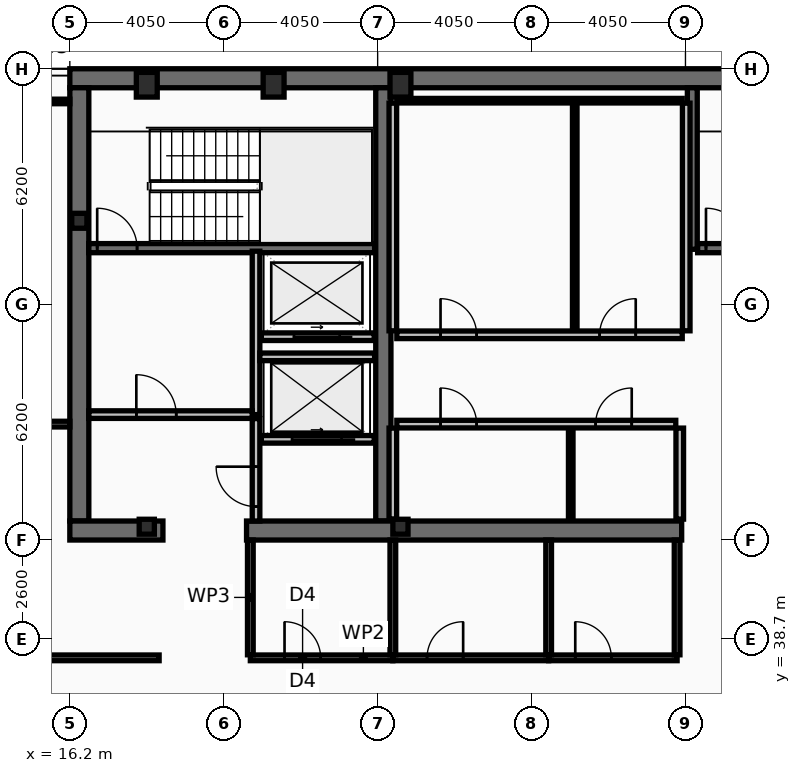
"""IFC4 building model, lengths in metres.
Left out: names, types, materials, properties, quantities, classifications, styles, units other than length and angle.
Written with IfcOpenShell. Run it as: python <this file> out.ifc"""

import sys

from ifc_helpers import new_model, si_unit, direction, frame, frame_2d, origin, origin_2d, place, context, subcontext, project, spatial, rectangle, hollow_rectangle, i_section, extrude, element, fill, save


model = new_model("IFC4")
c1 = context("Model", 3, precision=1e-05, world=origin(), true_north=direction((0.0, 1.0)))
c2 = subcontext(c1, "Body", "Model", "MODEL_VIEW")
j1 = project(units=[si_unit("LENGTHUNIT", "METRE"), si_unit("PLANEANGLEUNIT", "RADIAN")], contexts=[c1])
p1 = place(None, origin())
s1 = spatial("IfcSite", under=j1, at=p1, CompositionType="ELEMENT")
p2 = place(p1, origin())
s2 = spatial("IfcBuilding", under=s1, at=p2, CompositionType="ELEMENT")
p3 = place(p2, frame((0.0, 0.0, 291.4)))
s3 = spatial("IfcBuildingStorey", under=s2, at=p3, CompositionType="ELEMENT", Elevation=291.4)
p4 = place(p3, frame((16.2, 53.45, 0.0), z_axis=(0.0, 0.0, 1.0), x_axis=(1.0, 0.0, 0.0)))
e1 = element("IfcWall", 1, at=p4, inside=s3, PredefinedType="SHEAR", context=c2, shape_type="SweptSolid", body=[
    extrude(rectangle(XDim=40.5, YDim=0.5, at=frame_2d((20.25, 0.0))), origin(), (0.0, 0.0, 1.0), 3.44),
])
p5 = place(p3, frame((16.45, 41.8, 0.0), z_axis=(0.0, 0.0, 1.0), x_axis=(0.0, 1.0, 0.0)))
e2 = element("IfcWall", 2, at=p5, inside=s3, PredefinedType="SHEAR", context=c2, shape_type="SweptSolid", body=[
    extrude(rectangle(XDim=11.4, YDim=0.5, at=frame_2d((5.7, 0.0))), origin(), (0.0, 0.0, 1.0), 3.44),
])
p6 = place(p3, frame((24.45, 41.8, 0.0), z_axis=(0.0, 0.0, 1.0), x_axis=(0.0, 1.0, 0.0)))
e3 = element("IfcWall", 3, at=p6, inside=s3, PredefinedType="SHEAR", context=c2, shape_type="SweptSolid", body=[
    extrude(rectangle(XDim=11.4, YDim=0.4, at=frame_2d((5.7, 0.0))), origin(), (0.0, 0.0, 1.0), 3.44),
])
p7 = place(p3, frame((18.65, 41.55, 0.0), z_axis=(0.0, 0.0, 1.0), x_axis=(-1.0, 0.0, 0.0)))
e4 = element("IfcWall", 4, at=p7, inside=s3, PredefinedType="SHEAR", context=c2, shape_type="SweptSolid", body=[
    extrude(rectangle(XDim=2.45, YDim=0.5, at=frame_2d((1.225, 0.0))), origin(), (0.0, 0.0, 1.0), 3.44),
])
p8 = place(p3, frame((32.3, 41.55, 0.0), z_axis=(0.0, 0.0, 1.0), x_axis=(-1.0, 0.0, 0.0)))
e5 = element("IfcWall", 5, at=p8, inside=s3, PredefinedType="SHEAR", context=c2, shape_type="SweptSolid", body=[
    extrude(rectangle(XDim=11.45, YDim=0.5, at=frame_2d((5.725, 0.0))), origin(), (0.0, 0.0, 1.0), 3.44),
])
p9 = place(p3, frame((32.58, 48.95, 0.0), z_axis=(0.0, 0.0, 1.0), x_axis=(0.0, 1.0, 0.0)))
e6 = element("IfcWall", 6, at=p9, inside=s3, PredefinedType="SHEAR", context=c2, shape_type="SweptSolid", body=[
    extrude(rectangle(XDim=4.25, YDim=0.26, at=frame_2d((2.125, 0.0))), origin(), (0.0, 0.0, 1.0), 3.44),
])
p10 = place(p3, frame((16.7, 48.98, 0.0), z_axis=(0.0, 0.0, 1.0), x_axis=(1.0, 0.0, 0.0)))
e7 = element("IfcWall", 7, at=p10, inside=s3, PredefinedType="SHEAR", context=c2, shape_type="SweptSolid", body=[
    extrude(rectangle(XDim=7.52, YDim=0.24, at=frame_2d((3.76, 0.0))), origin(), (0.0, 0.0, 1.0), 3.44),
])
p11 = place(p10, frame((0.22, 0.0, 0.0)))
e8 = element("IfcOpeningElement", 8, at=p11, cuts=e7, PredefinedType="OPENING", context=c2, shape_type="SweptSolid", body=[
    extrude(rectangle(XDim=1.05, YDim=2.15, at=frame_2d((0.525, 1.075))), frame((0.0, 0.13, 0.0), z_axis=(0.0, -1.0, 0.0), x_axis=(1.0, 0.0, 0.0)), (0.0, 0.0, 1.0), 0.26),
])
p12 = place(p3, frame((32.72, 48.98, 0.0), z_axis=(0.0, 0.0, 1.0), x_axis=(1.0, 0.0, 0.0)))
e9 = element("IfcWall", 9, at=p12, inside=s3, PredefinedType="SHEAR", context=c2, shape_type="SweptSolid", body=[
    extrude(rectangle(XDim=7.56, YDim=0.24, at=frame_2d((3.78, 0.0))), origin(), (0.0, 0.0, 1.0), 3.44),
])
p13 = place(p12, frame((0.22, 0.0, 0.0)))
e10 = element("IfcOpeningElement", 10, at=p13, cuts=e9, PredefinedType="OPENING", context=c2, shape_type="SweptSolid", body=[
    extrude(rectangle(XDim=1.05, YDim=2.15, at=frame_2d((0.525, 1.075))), frame((0.0, 0.13, 0.0), z_axis=(0.0, -1.0, 0.0), x_axis=(1.0, 0.0, 0.0)), (0.0, 0.0, 1.0), 0.26),
])
for number, where, z_axis, x_axis in (
    (11, (18.225, 53.28, 0.0), (0.0, 0.0, 1.0), (1.0, 0.0, 0.0)),
    (12, (21.562, 53.28, 0.0), (0.0, 0.0, 1.0), (1.0, 0.0, 0.0)),
    (13, (24.9, 53.28, 0.0), (0.0, 0.0, 1.0), (1.0, 0.0, 0.0)),
):
    element("IfcColumn", number, at=place(p3, frame(where, z_axis=z_axis, x_axis=x_axis)), inside=s3, PredefinedType="COLUMN", context=c2, shape_type="SweptSolid", body=[
        extrude(hollow_rectangle(XDim=0.55, YDim=0.65, WallThickness=0.04, at=origin_2d()), origin(), (0.0, 0.0, 1.0), 3.6),
    ])
for number, where, z_axis, x_axis in (
    (14, (16.45, 49.7, 0.0), (0.0, 0.0, 1.0), (1.0, 0.0, 0.0)),
    (15, (18.225, 41.65, 0.0), (0.0, 0.0, 1.0), (1.0, 0.0, 0.0)),
    (16, (24.9, 41.65, 0.0), (0.0, 0.0, 1.0), (1.0, 0.0, 0.0)),
):
    element("IfcColumn", number, at=place(p3, frame(where, z_axis=z_axis, x_axis=x_axis)), inside=s3, PredefinedType="COLUMN", context=c2, shape_type="SweptSolid", body=[
        extrude(i_section(OverallWidth=0.399, OverallDepth=0.393, WebThickness=0.023, FlangeThickness=0.037, at=origin_2d()), origin(), (0.0, 0.0, 1.0), 3.6),
    ])
p14 = place(p3, frame((24.21, 43.95, 0.0), z_axis=(0.0, 0.0, 1.0), x_axis=(-1.0, 0.0, 0.0)))
e17 = element("IfcWall", 17, at=p14, inside=s3, PredefinedType="PARTITIONING", context=c2, shape_type="SweptSolid", body=[
    extrude(rectangle(XDim=2.97, YDim=0.2, at=frame_2d((1.485, 0.0))), origin(), (0.0, 0.0, 1.0), 3.44),
])
p15 = place(p14, frame((0.86, 0.0, 0.0)))
e18 = element("IfcOpeningElement", 18, at=p15, cuts=e17, PredefinedType="OPENING", context=c2, shape_type="SweptSolid", body=[
    extrude(rectangle(XDim=1.3, YDim=2.18, at=frame_2d((0.65, 1.09))), frame((0.0, 0.11, 0.0), z_axis=(0.0, -1.0, 0.0), x_axis=(1.0, 0.0, 0.0)), (0.0, 0.0, 1.0), 0.22),
])
p16 = place(p3, frame((24.21, 46.65, 0.0), z_axis=(0.0, 0.0, 1.0), x_axis=(-1.0, 0.0, 0.0)))
e19 = element("IfcWall", 19, at=p16, inside=s3, PredefinedType="PARTITIONING", context=c2, shape_type="SweptSolid", body=[
    extrude(rectangle(XDim=2.97, YDim=0.2, at=frame_2d((1.485, 0.0))), origin(), (0.0, 0.0, 1.0), 3.44),
])
p17 = place(p16, frame((0.91, 0.0, 0.0)))
e20 = element("IfcOpeningElement", 20, at=p17, cuts=e19, PredefinedType="OPENING", context=c2, shape_type="SweptSolid", body=[
    extrude(rectangle(XDim=1.2, YDim=2.18, at=frame_2d((0.6, 1.09))), frame((0.0, 0.11, 0.0), z_axis=(0.0, -1.0, 0.0), x_axis=(1.0, 0.0, 0.0)), (0.0, 0.0, 1.0), 0.22),
])
p18 = place(p3, frame((21.1, 44.6, 0.0), z_axis=(0.0, 0.0, 1.0), x_axis=(0.0, 1.0, 0.0)))
e21 = element("IfcWall", 21, at=p18, inside=s3, PredefinedType="PARTITIONING", context=c2, shape_type="SweptSolid", body=[
    extrude(rectangle(XDim=4.3, YDim=0.2, at=frame_2d((2.15, 0.0))), origin(), (0.0, 0.0, 1.0), 3.44),
])
p19 = place(p3, frame((16.7, 44.6, 0.0), z_axis=(0.0, 0.0, 1.0), x_axis=(1.0, 0.0, 0.0)))
e22 = element("IfcWall", 22, at=p19, inside=s3, PredefinedType="PARTITIONING", context=c2, shape_type="SweptSolid", body=[
    extrude(rectangle(XDim=4.3, YDim=0.2, at=frame_2d((2.15, 0.0))), origin(), (0.0, 0.0, 1.0), 3.44),
])
p20 = place(p19, frame((1.25, 0.0, 0.0)))
e23 = element("IfcOpeningElement", 23, at=p20, cuts=e22, PredefinedType="OPENING", context=c2, shape_type="SweptSolid", body=[
    extrude(rectangle(XDim=1.05, YDim=2.15, at=frame_2d((0.525, 1.075))), frame((0.0, 0.11, 0.0), z_axis=(0.0, -1.0, 0.0), x_axis=(1.0, 0.0, 0.0)), (0.0, 0.0, 1.0), 0.22),
])
p21 = place(p3, frame((21.2, 46.12, 0.0), z_axis=(0.0, 0.0, 1.0), x_axis=(1.0, 0.0, 0.0)))
e24 = element("IfcWall", 24, at=p21, inside=s3, PredefinedType="PARTITIONING", context=c2, shape_type="SweptSolid", body=[
    extrude(rectangle(XDim=3.02, YDim=0.2, at=frame_2d((1.51, 0.0))), origin(), (0.0, 0.0, 1.0), 3.44),
])
p22 = place(p3, frame((21.1, 41.8, 0.0), z_axis=(0.0, 0.0, 1.0), x_axis=(0.0, 1.0, 0.0)))
e25 = element("IfcWall", 25, at=p22, inside=s3, PredefinedType="PARTITIONING", context=c2, shape_type="SweptSolid", body=[
    extrude(rectangle(XDim=2.695, YDim=0.2, at=frame_2d((1.348, 0.0))), origin(), (0.0, 0.0, 1.0), 3.44),
])
p23 = place(p22, frame((0.38, 0.0, 0.0)))
e26 = element("IfcOpeningElement", 26, at=p23, cuts=e25, PredefinedType="OPENING", context=c2, shape_type="SweptSolid", body=[
    extrude(rectangle(XDim=1.05, YDim=2.15, at=frame_2d((0.525, 1.075))), frame((0.0, 0.11, 0.0), z_axis=(0.0, -1.0, 0.0), x_axis=(1.0, 0.0, 0.0)), (0.0, 0.0, 1.0), 0.22),
])
for number, where, z_axis, x_axis in (
    (27, (24.7, 46.805, 0.0), (0.0, 0.0, 1.0), (0.0, 1.0, 0.0)),
    (28, (32.42, 46.805, 0.0), (0.0, 0.0, 1.0), (0.0, 1.0, 0.0)),
):
    element("IfcWall", number, at=place(p3, frame(where, z_axis=z_axis, x_axis=x_axis)), inside=s3, PredefinedType="PARTITIONING", context=c2, shape_type="SweptSolid", body=[
        extrude(rectangle(XDim=5.99, YDim=0.2, at=frame_2d((2.995, 0.0))), origin(), (0.0, 0.0, 1.0), 3.44),
    ])
p24 = place(p3, frame((24.805, 52.86, 0.0), z_axis=(0.0, 0.0, 1.0), x_axis=(1.0, 0.0, 0.0)))
e29 = element("IfcWall", 29, at=p24, inside=s3, PredefinedType="PARTITIONING", context=c2, shape_type="SweptSolid", body=[
    extrude(rectangle(XDim=7.51, YDim=0.12, at=frame_2d((3.755, 0.0))), origin(), (0.0, 0.0, 1.0), 3.44),
])
p25 = place(p3, frame((29.486, 46.805, 0.0), z_axis=(0.0, 0.0, 1.0), x_axis=(0.0, 1.0, 0.0)))
e30 = element("IfcWall", 30, at=p25, inside=s3, PredefinedType="PARTITIONING", context=c2, shape_type="SweptSolid", body=[
    extrude(rectangle(XDim=5.99, YDim=0.12, at=frame_2d((2.995, 0.0))), origin(), (0.0, 0.0, 1.0), 3.44),
])
p26 = place(p3, frame((24.805, 46.7, 0.0), z_axis=(0.0, 0.0, 1.0), x_axis=(1.0, 0.0, 0.0)))
e31 = element("IfcWall", 31, at=p26, inside=s3, PredefinedType="PARTITIONING", context=c2, shape_type="SweptSolid", body=[
    extrude(rectangle(XDim=7.51, YDim=0.2, at=frame_2d((3.755, 0.0))), origin(), (0.0, 0.0, 1.0), 3.44),
])
p27 = place(p26, frame((1.15, 0.0, 0.0)))
e32 = element("IfcOpeningElement", 32, at=p27, cuts=e31, PredefinedType="OPENING", context=c2, shape_type="SweptSolid", body=[
    extrude(rectangle(XDim=0.95, YDim=2.1, at=frame_2d((0.475, 1.05))), frame((0.0, 0.11, 0.0), z_axis=(0.0, -1.0, 0.0), x_axis=(1.0, 0.0, 0.0)), (0.0, 0.0, 1.0), 0.22),
])
p28 = place(p26, frame((5.336, 0.0, 0.0)))
e33 = element("IfcOpeningElement", 33, at=p28, cuts=e31, PredefinedType="OPENING", context=c2, shape_type="SweptSolid", body=[
    extrude(rectangle(XDim=0.95, YDim=2.1, at=frame_2d((0.475, 1.05))), frame((0.0, 0.11, 0.0), z_axis=(0.0, -1.0, 0.0), x_axis=(1.0, 0.0, 0.0)), (0.0, 0.0, 1.0), 0.22),
])
for number, where, z_axis, x_axis in (
    (34, (24.7, 41.85, 0.0), (0.0, 0.0, 1.0), (0.0, 1.0, 0.0)),
    (35, (32.25, 41.85, 0.0), (0.0, 0.0, 1.0), (0.0, 1.0, 0.0)),
):
    element("IfcWall", number, at=place(p3, frame(where, z_axis=z_axis, x_axis=x_axis)), inside=s3, PredefinedType="PARTITIONING", context=c2, shape_type="SweptSolid", body=[
        extrude(rectangle(XDim=2.395, YDim=0.2, at=frame_2d((1.198, 0.0))), origin(), (0.0, 0.0, 1.0), 3.44),
    ])
p29 = place(p3, frame((29.381, 41.85, 0.0), z_axis=(0.0, 0.0, 1.0), x_axis=(0.0, 1.0, 0.0)))
e36 = element("IfcWall", 36, at=p29, inside=s3, PredefinedType="PARTITIONING", context=c2, shape_type="SweptSolid", body=[
    extrude(rectangle(XDim=2.395, YDim=0.12, at=frame_2d((1.198, 0.0))), origin(), (0.0, 0.0, 1.0), 3.44),
])
p30 = place(p3, frame((24.805, 44.35, 0.0), z_axis=(0.0, 0.0, 1.0), x_axis=(1.0, 0.0, 0.0)))
e37 = element("IfcWall", 37, at=p30, inside=s3, PredefinedType="PARTITIONING", context=c2, shape_type="SweptSolid", body=[
    extrude(rectangle(XDim=7.34, YDim=0.2, at=frame_2d((3.67, 0.0))), origin(), (0.0, 0.0, 1.0), 3.44),
])
p31 = place(p30, frame((1.15, 0.0, 0.0)))
e38 = element("IfcOpeningElement", 38, at=p31, cuts=e37, PredefinedType="OPENING", context=c2, shape_type="SweptSolid", body=[
    extrude(rectangle(XDim=0.95, YDim=2.1, at=frame_2d((0.475, 1.05))), frame((0.0, 0.11, 0.0), z_axis=(0.0, -1.0, 0.0), x_axis=(1.0, 0.0, 0.0)), (0.0, 0.0, 1.0), 0.22),
])
p32 = place(p30, frame((5.231, 0.0, 0.0)))
e39 = element("IfcOpeningElement", 39, at=p32, cuts=e37, PredefinedType="OPENING", context=c2, shape_type="SweptSolid", body=[
    extrude(rectangle(XDim=0.95, YDim=2.1, at=frame_2d((0.475, 1.05))), frame((0.0, 0.11, 0.0), z_axis=(0.0, -1.0, 0.0), x_axis=(1.0, 0.0, 0.0)), (0.0, 0.0, 1.0), 0.22),
])
p33 = place(p3, frame((20.95, 38.2, 0.0), z_axis=(0.0, 0.0, 1.0), x_axis=(1.0, 0.0, 0.0)))
e40 = element("IfcWall", 40, at=p33, inside=s3, PredefinedType="PARTITIONING", context=c2, shape_type="SweptSolid", body=[
    extrude(rectangle(XDim=3.75, YDim=0.15, at=frame_2d((1.875, 0.0))), origin(), (0.0, 0.0, 1.0), 2.78),
])
p34 = place(p33, frame((0.9, 0.0, 0.0)))
e41 = element("IfcOpeningElement", 41, at=p34, cuts=e40, PredefinedType="OPENING", context=c2, shape_type="SweptSolid", body=[
    extrude(rectangle(XDim=0.95, YDim=2.05, at=frame_2d((0.475, 1.025))), frame((0.0, 0.085, 0.0), z_axis=(0.0, -1.0, 0.0), x_axis=(1.0, 0.0, 0.0)), (0.0, 0.0, 1.0), 0.17),
])
p35 = place(p3, frame((24.7, 38.2, 0.0), z_axis=(0.0, 0.0, 1.0), x_axis=(1.0, 0.0, 0.0)))
e42 = element("IfcWall", 42, at=p35, inside=s3, PredefinedType="PARTITIONING", context=c2, shape_type="SweptSolid", body=[
    extrude(rectangle(XDim=4.1, YDim=0.15, at=frame_2d((2.05, 0.0))), origin(), (0.0, 0.0, 1.0), 2.78),
])
p36 = place(p35, frame((0.9, 0.0, 0.0)))
e43 = element("IfcOpeningElement", 43, at=p36, cuts=e42, PredefinedType="OPENING", context=c2, shape_type="SweptSolid", body=[
    extrude(rectangle(XDim=0.95, YDim=2.05, at=frame_2d((0.475, 1.025))), frame((0.0, 0.085, 0.0), z_axis=(0.0, -1.0, 0.0), x_axis=(1.0, 0.0, 0.0)), (0.0, 0.0, 1.0), 0.17),
])
p37 = place(p3, frame((28.8, 38.2, 0.0), z_axis=(0.0, 0.0, 1.0), x_axis=(1.0, 0.0, 0.0)))
e44 = element("IfcWall", 44, at=p37, inside=s3, PredefinedType="PARTITIONING", context=c2, shape_type="SweptSolid", body=[
    extrude(rectangle(XDim=3.38, YDim=0.15, at=frame_2d((1.69, 0.0))), origin(), (0.0, 0.0, 1.0), 2.78),
])
p38 = place(p37, frame((0.7, 0.0, 0.0)))
e45 = element("IfcOpeningElement", 45, at=p38, cuts=e44, PredefinedType="OPENING", context=c2, shape_type="SweptSolid", body=[
    extrude(rectangle(XDim=0.95, YDim=2.05, at=frame_2d((0.475, 1.025))), frame((0.0, 0.085, 0.0), z_axis=(0.0, -1.0, 0.0), x_axis=(1.0, 0.0, 0.0)), (0.0, 0.0, 1.0), 0.17),
])
p39 = place(p3, frame((20.95, 38.28, 0.0), z_axis=(0.0, 0.0, 1.0), x_axis=(0.0, 1.0, 0.0)))
e46 = element("IfcWall", 46, at=p39, inside=s3, PredefinedType="PARTITIONING", context=c2, shape_type="SweptSolid", body=[
    extrude(rectangle(XDim=3.02, YDim=0.15, at=frame_2d((1.51, 0.0))), origin(), (0.0, 0.0, 1.0), 3.44),
])
p40 = place(p3, frame((24.7, 38.28, 0.0), z_axis=(0.0, 0.0, 1.0), x_axis=(0.0, 1.0, 0.0)))
e47 = element("IfcWall", 47, at=p40, inside=s3, PredefinedType="PARTITIONING", context=c2, shape_type="SweptSolid", body=[
    extrude(rectangle(XDim=3.02, YDim=0.15, at=frame_2d((1.51, 0.0))), origin(), (0.0, 0.0, 1.0), 2.78),
])
for number, where, z_axis, x_axis in (
    (48, (28.8, 38.28, 0.0), (0.0, 0.0, 1.0), (0.0, 1.0, 0.0)),
    (49, (32.18, 38.28, 0.0), (0.0, 0.0, 1.0), (0.0, 1.0, 0.0)),
):
    element("IfcWall", number, at=place(p3, frame(where, z_axis=z_axis, x_axis=x_axis)), inside=s3, PredefinedType="PARTITIONING", context=c2, shape_type="SweptSolid", body=[
        extrude(rectangle(XDim=3.02, YDim=0.15, at=frame_2d((1.51, 0.0))), origin(), (0.0, 0.0, 1.0), 3.44),
    ])
p41 = place(p3, frame((12.03, 38.2, 0.0), z_axis=(0.0, 0.0, 1.0), x_axis=(1.0, 0.0, 0.0)))
e50 = element("IfcWall", 50, at=p41, inside=s3, PredefinedType="PARTITIONING", context=c2, shape_type="SweptSolid", body=[
    extrude(rectangle(XDim=6.52, YDim=0.15, at=frame_2d((3.26, 0.0))), origin(), (0.0, 0.0, 1.0), 2.78),
])
p42 = place(p41, frame((2.32, 0.0, 0.0)))
e51 = element("IfcOpeningElement", 51, at=p42, cuts=e50, PredefinedType="OPENING", context=c2, shape_type="SweptSolid", body=[
    extrude(rectangle(XDim=0.95, YDim=2.05, at=frame_2d((0.475, 1.025))), frame((0.0, 0.085, 0.0), z_axis=(0.0, -1.0, 0.0), x_axis=(1.0, 0.0, 0.0)), (0.0, 0.0, 1.0), 0.17),
])
p43 = place(p3, frame((12.095, 44.35, 0.0), z_axis=(0.0, 0.0, 1.0), x_axis=(1.0, 0.0, 0.0)))
e52 = element("IfcWall", 52, at=p43, inside=s3, PredefinedType="PARTITIONING", context=c2, shape_type="SweptSolid", body=[
    extrude(rectangle(XDim=4.105, YDim=0.15, at=frame_2d((2.052, 0.0))), origin(), (0.0, 0.0, 1.0), 2.88),
])
p44 = place(p43, frame((2.32, 0.0, 0.0)))
e53 = element("IfcOpeningElement", 53, at=p44, cuts=e52, PredefinedType="OPENING", context=c2, shape_type="SweptSolid", body=[
    extrude(rectangle(XDim=0.9, YDim=2.05, at=frame_2d((0.45, 1.025))), frame((0.0, 0.085, 0.0), z_axis=(0.0, -1.0, 0.0), x_axis=(1.0, 0.0, 0.0)), (0.0, 0.0, 1.0), 0.17),
])
p45 = place(p3, frame((12.095, 52.84, 0.0), z_axis=(0.0, 0.0, 1.0), x_axis=(1.0, 0.0, 0.0)))
e54 = element("IfcWall", 54, at=p45, inside=s3, PredefinedType="PARTITIONING", context=c2, shape_type="SweptSolid", body=[
    extrude(rectangle(XDim=4.105, YDim=0.12, at=frame_2d((2.052, 0.0))), origin(), (0.0, 0.0, 1.0), 3.44),
])
p46 = place(p11, origin())
e55 = element("IfcDoor", 55, at=p46, inside=s3, OperationType="SINGLE_SWING_LEFT", PredefinedType="DOOR", context=c2, shape_type="SweptSolid", body=[
    extrude(rectangle(XDim=1.05, YDim=2.15, at=frame_2d((0.525, 1.075))), frame((0.0, 0.025, 0.0), z_axis=(0.0, -1.0, 0.0), x_axis=(1.0, 0.0, 0.0)), (0.0, 0.0, 1.0), 0.05),
])
fill(e8, e55)
p47 = place(p13, origin())
e56 = element("IfcDoor", 56, at=p47, inside=s3, OperationType="SINGLE_SWING_LEFT", PredefinedType="DOOR", context=c2, shape_type="SweptSolid", body=[
    extrude(rectangle(XDim=1.05, YDim=2.15, at=frame_2d((0.525, 1.075))), frame((0.0, 0.025, 0.0), z_axis=(0.0, -1.0, 0.0), x_axis=(1.0, 0.0, 0.0)), (0.0, 0.0, 1.0), 0.05),
])
fill(e10, e56)
p48 = place(p15, origin())
e57 = element("IfcDoor", 57, at=p48, inside=s3, OperationType="SLIDING_TO_LEFT", PredefinedType="DOOR", context=c2, shape_type="SweptSolid", body=[
    extrude(rectangle(XDim=1.3, YDim=2.18, at=frame_2d((0.65, 1.09))), frame((0.0, 0.025, 0.0), z_axis=(0.0, -1.0, 0.0), x_axis=(1.0, 0.0, 0.0)), (0.0, 0.0, 1.0), 0.05),
])
fill(e18, e57)
p49 = place(p17, origin())
e58 = element("IfcDoor", 58, at=p49, inside=s3, OperationType="SLIDING_TO_LEFT", PredefinedType="DOOR", context=c2, shape_type="SweptSolid", body=[
    extrude(rectangle(XDim=1.2, YDim=2.18, at=frame_2d((0.6, 1.09))), frame((0.0, 0.025, 0.0), z_axis=(0.0, -1.0, 0.0), x_axis=(1.0, 0.0, 0.0)), (0.0, 0.0, 1.0), 0.05),
])
fill(e20, e58)
p50 = place(p20, origin())
e59 = element("IfcDoor", 59, at=p50, inside=s3, OperationType="SINGLE_SWING_LEFT", PredefinedType="DOOR", context=c2, shape_type="SweptSolid", body=[
    extrude(rectangle(XDim=1.05, YDim=2.15, at=frame_2d((0.525, 1.075))), frame((0.0, 0.025, 0.0), z_axis=(0.0, -1.0, 0.0), x_axis=(1.0, 0.0, 0.0)), (0.0, 0.0, 1.0), 0.05),
])
fill(e23, e59)
p51 = place(p23, origin())
e60 = element("IfcDoor", 60, at=p51, inside=s3, OperationType="SINGLE_SWING_RIGHT", PredefinedType="DOOR", context=c2, shape_type="SweptSolid", body=[
    extrude(rectangle(XDim=1.05, YDim=2.15, at=frame_2d((0.525, 1.075))), frame((0.0, 0.025, 0.0), z_axis=(0.0, -1.0, 0.0), x_axis=(1.0, 0.0, 0.0)), (0.0, 0.0, 1.0), 0.05),
])
fill(e26, e60)
p52 = place(p27, origin())
e61 = element("IfcDoor", 61, at=p52, inside=s3, OperationType="SINGLE_SWING_LEFT", PredefinedType="DOOR", context=c2, shape_type="SweptSolid", body=[
    extrude(rectangle(XDim=0.95, YDim=2.1, at=frame_2d((0.475, 1.05))), frame((0.0, 0.025, 0.0), z_axis=(0.0, -1.0, 0.0), x_axis=(1.0, 0.0, 0.0)), (0.0, 0.0, 1.0), 0.05),
])
fill(e32, e61)
p53 = place(p28, origin())
e62 = element("IfcDoor", 62, at=p53, inside=s3, OperationType="SINGLE_SWING_RIGHT", PredefinedType="DOOR", context=c2, shape_type="SweptSolid", body=[
    extrude(rectangle(XDim=0.95, YDim=2.1, at=frame_2d((0.475, 1.05))), frame((0.0, 0.025, 0.0), z_axis=(0.0, -1.0, 0.0), x_axis=(1.0, 0.0, 0.0)), (0.0, 0.0, 1.0), 0.05),
])
fill(e33, e62)
p54 = place(p31, origin())
e63 = element("IfcDoor", 63, at=p54, inside=s3, OperationType="SINGLE_SWING_LEFT", PredefinedType="DOOR", context=c2, shape_type="SweptSolid", body=[
    extrude(rectangle(XDim=0.95, YDim=2.1, at=frame_2d((0.475, 1.05))), frame((0.0, 0.025, 0.0), z_axis=(0.0, -1.0, 0.0), x_axis=(1.0, 0.0, 0.0)), (0.0, 0.0, 1.0), 0.05),
])
fill(e38, e63)
p55 = place(p32, origin())
e64 = element("IfcDoor", 64, at=p55, inside=s3, OperationType="SINGLE_SWING_RIGHT", PredefinedType="DOOR", context=c2, shape_type="SweptSolid", body=[
    extrude(rectangle(XDim=0.95, YDim=2.1, at=frame_2d((0.475, 1.05))), frame((0.0, 0.025, 0.0), z_axis=(0.0, -1.0, 0.0), x_axis=(1.0, 0.0, 0.0)), (0.0, 0.0, 1.0), 0.05),
])
fill(e39, e64)
p56 = place(p34, origin())
e65 = element("IfcDoor", 65, at=p56, inside=s3, OperationType="SINGLE_SWING_LEFT", PredefinedType="DOOR", context=c2, shape_type="SweptSolid", body=[
    extrude(rectangle(XDim=0.95, YDim=2.05, at=frame_2d((0.475, 1.025))), frame((0.0, 0.025, 0.0), z_axis=(0.0, -1.0, 0.0), x_axis=(1.0, 0.0, 0.0)), (0.0, 0.0, 1.0), 0.05),
])
fill(e41, e65)
p57 = place(p36, origin())
e66 = element("IfcDoor", 66, at=p57, inside=s3, OperationType="SINGLE_SWING_RIGHT", PredefinedType="DOOR", context=c2, shape_type="SweptSolid", body=[
    extrude(rectangle(XDim=0.95, YDim=2.05, at=frame_2d((0.475, 1.025))), frame((0.0, 0.025, 0.0), z_axis=(0.0, -1.0, 0.0), x_axis=(1.0, 0.0, 0.0)), (0.0, 0.0, 1.0), 0.05),
])
fill(e43, e66)
p58 = place(p38, origin())
e67 = element("IfcDoor", 67, at=p58, inside=s3, OperationType="SINGLE_SWING_LEFT", PredefinedType="DOOR", context=c2, shape_type="SweptSolid", body=[
    extrude(rectangle(XDim=0.95, YDim=2.05, at=frame_2d((0.475, 1.025))), frame((0.0, 0.025, 0.0), z_axis=(0.0, -1.0, 0.0), x_axis=(1.0, 0.0, 0.0)), (0.0, 0.0, 1.0), 0.05),
])
fill(e45, e67)
save(model, sys.argv[1])
